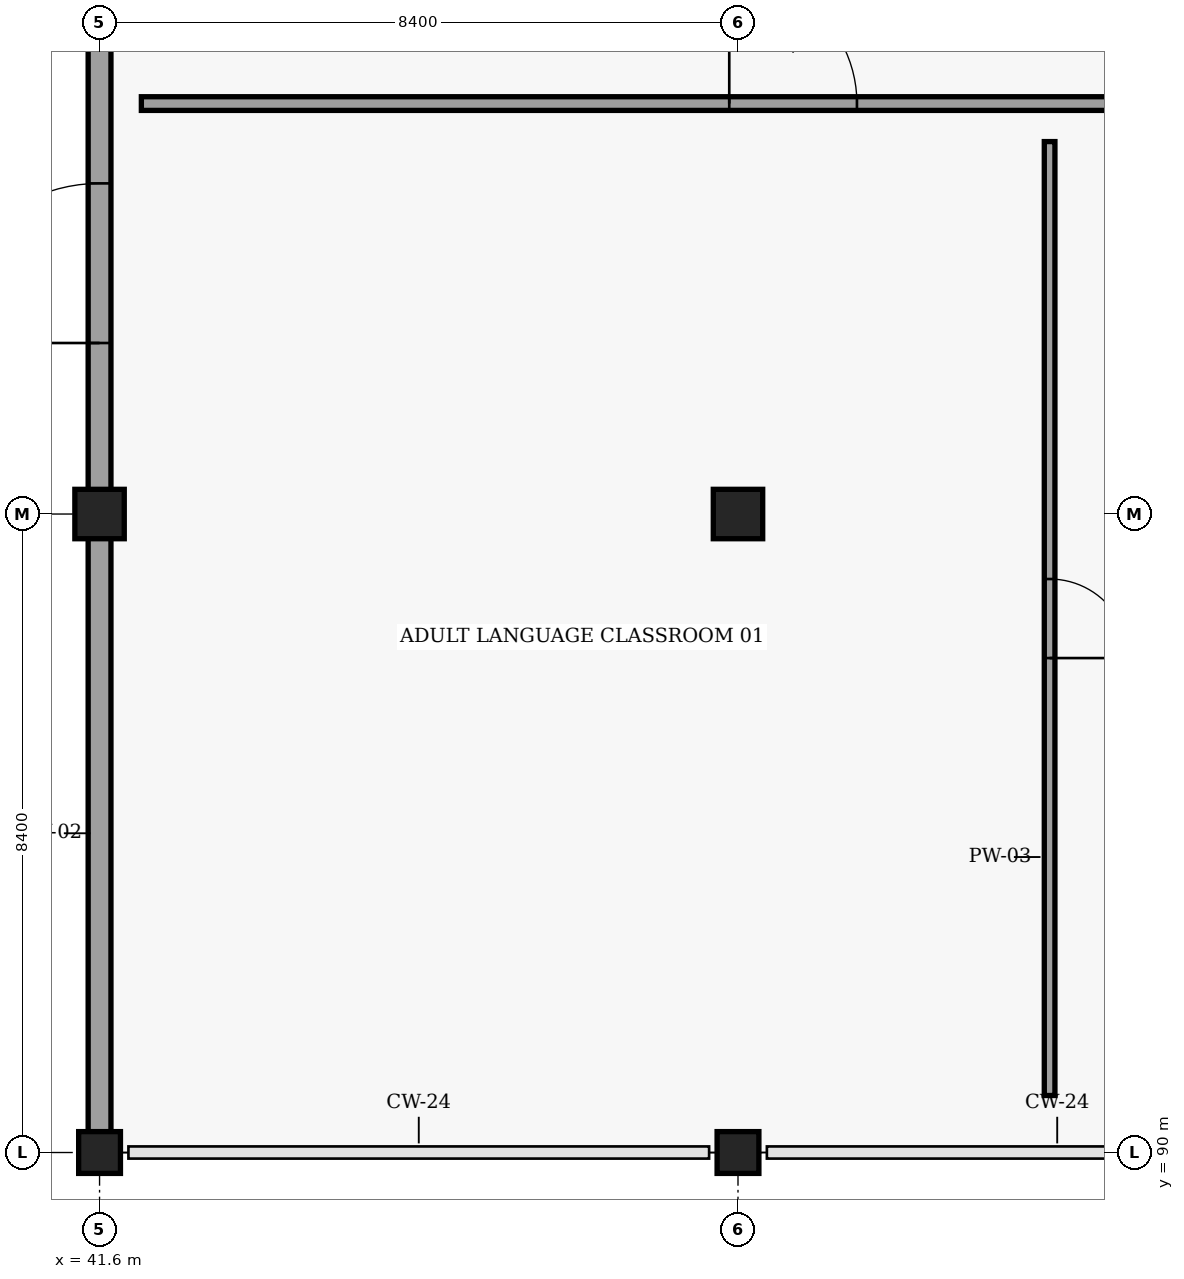
"""IFC4 building model, lengths in metres.
Left out: names, types, materials, properties, quantities, classifications, styles, units other than length and angle.
Written with IfcOpenShell. Run it as: python <this file> out.ifc"""

import sys

from ifc_helpers import new_model, si_unit, direction, frame, frame_2d, origin, origin_2d, place, context, subcontext, project, spatial, rectangle, circle, extrude, element, fill, save


model = new_model("IFC4")
c1 = context("Model", 3, precision=1e-05, world=origin(), true_north=direction((0.0, 1.0)))
c2 = subcontext(c1, "Body", "Model", "MODEL_VIEW")
j1 = project(units=[si_unit("LENGTHUNIT", "METRE"), si_unit("PLANEANGLEUNIT", "RADIAN")], contexts=[c1])
p1 = place(None, origin())
s1 = spatial("IfcSite", under=j1, at=p1, CompositionType="ELEMENT")
p2 = place(p1, origin())
s2 = spatial("IfcBuilding", under=s1, at=p2, CompositionType="ELEMENT")
p3 = place(p2, origin())
s3 = spatial("IfcBuildingStorey", under=s2, at=p3, CompositionType="ELEMENT", Elevation=0.0)
p4 = place(p3, frame((41.6, 90.0, 0.0), z_axis=(0.0, 0.0, 1.0), x_axis=(1.0, 0.0, 0.0)))
e1 = element("IfcColumn", 1, at=p4, inside=s3, PredefinedType="PILASTER", context=c2, shape_type="SweptSolid", body=[
    extrude(circle(Radius=0.275, at=origin_2d()), origin(), (0.0, 0.0, 1.0), 4.8),
])
p5 = place(p3, frame((41.6, 98.4, 0.0), z_axis=(0.0, 0.0, 1.0), x_axis=(1.0, 0.0, 0.0)))
e2 = element("IfcColumn", 2, at=p5, inside=s3, PredefinedType="COLUMN", context=c2, shape_type="SweptSolid", body=[
    extrude(rectangle(XDim=0.65, YDim=0.65, at=origin_2d()), origin(), (0.0, 0.0, 1.0), 4.8),
])
p6 = place(p3, frame((50.0, 90.0, 0.0), z_axis=(0.0, 0.0, 1.0), x_axis=(1.0, 0.0, 0.0)))
e3 = element("IfcColumn", 3, at=p6, inside=s3, PredefinedType="PILASTER", context=c2, shape_type="SweptSolid", body=[
    extrude(circle(Radius=0.275, at=origin_2d()), origin(), (0.0, 0.0, 1.0), 4.8),
])
p7 = place(p3, frame((50.0, 98.4, 0.0), z_axis=(0.0, 0.0, 1.0), x_axis=(1.0, 0.0, 0.0)))
e4 = element("IfcColumn", 4, at=p7, inside=s3, PredefinedType="COLUMN", context=c2, shape_type="SweptSolid", body=[
    extrude(rectangle(XDim=0.65, YDim=0.65, at=origin_2d()), origin(), (0.0, 0.0, 1.0), 4.8),
])
p8 = place(p3, frame((41.6, 90.1, 0.0), z_axis=(0.0, 0.0, 1.0), x_axis=(0.0, 1.0, 0.0)))
e5 = element("IfcWall", 5, at=p8, inside=s3, PredefinedType="SOLIDWALL", context=c2, shape_type="SweptSolid", body=[
    extrude(rectangle(XDim=8.2, YDim=0.3, at=frame_2d((4.1, 0.0))), origin(), (0.0, 0.0, 1.0), 4.075),
])
p9 = place(p3, frame((41.6, 98.5, 0.0), z_axis=(0.0, 0.0, 1.0), x_axis=(0.0, 1.0, 0.0)))
e6 = element("IfcWall", 6, at=p9, inside=s3, PredefinedType="SOLIDWALL", context=c2, shape_type="SweptSolid", body=[
    extrude(rectangle(XDim=8.2, YDim=0.3, at=frame_2d((4.1, 0.0))), origin(), (0.0, 0.0, 1.0), 4.075),
])
p10 = place(p9, frame((2.15, 0.0, 0.0)))
e7 = element("IfcOpeningElement", 7, at=p10, cuts=e6, PredefinedType="OPENING", context=c2, shape_type="SweptSolid", body=[
    extrude(rectangle(XDim=2.1, YDim=2.35, at=frame_2d((1.05, 1.175))), frame((0.0, 0.16, 0.0), z_axis=(0.0, -1.0, 0.0), x_axis=(1.0, 0.0, 0.0)), (0.0, 0.0, 1.0), 0.32),
])
p11 = place(p3, frame((42.15, 103.8, 0.0), z_axis=(0.0, 0.0, 1.0), x_axis=(1.0, 0.0, 0.0)))
e8 = element("IfcWall", 8, at=p11, inside=s3, PredefinedType="PARTITIONING", context=c2, shape_type="SweptSolid", body=[
    extrude(rectangle(XDim=102.9, YDim=0.18, at=frame_2d((51.45, 0.0))), origin(), (0.0, 0.0, 1.0), 3.775),
])
p12 = place(p11, frame((7.735, 0.0, 0.0)))
e9 = element("IfcOpeningElement", 9, at=p12, cuts=e8, PredefinedType="OPENING", context=c2, shape_type="SweptSolid", body=[
    extrude(rectangle(XDim=1.68, YDim=2.26, at=frame_2d((0.84, 1.13))), frame((0.0, 0.1, 0.0), z_axis=(0.0, -1.0, 0.0), x_axis=(1.0, 0.0, 0.0)), (0.0, 0.0, 1.0), 0.2),
])
p13 = place(p11, frame((16.63, 0.0, 0.0)))
e10 = element("IfcOpeningElement", 10, at=p13, cuts=e8, PredefinedType="OPENING", context=c2, shape_type="SweptSolid", body=[
    extrude(rectangle(XDim=1.04, YDim=2.08, at=frame_2d((0.52, 1.04))), frame((0.0, 0.1, 0.0), z_axis=(0.0, -1.0, 0.0), x_axis=(1.0, 0.0, 0.0)), (0.0, 0.0, 1.0), 0.2),
])
p14 = place(p11, frame((24.725, 0.0, 0.0)))
e11 = element("IfcOpeningElement", 11, at=p14, cuts=e8, PredefinedType="OPENING", context=c2, shape_type="SweptSolid", body=[
    extrude(rectangle(XDim=2.0, YDim=2.3, at=frame_2d((1.0, 1.15))), frame((0.0, 0.1, 0.0), z_axis=(0.0, -1.0, 0.0), x_axis=(1.0, 0.0, 0.0)), (0.0, 0.0, 1.0), 0.2),
])
p15 = place(p11, frame((33.375, 0.0, 0.0)))
e12 = element("IfcOpeningElement", 12, at=p15, cuts=e8, PredefinedType="OPENING", context=c2, shape_type="SweptSolid", body=[
    extrude(rectangle(XDim=1.85, YDim=2.22, at=frame_2d((0.925, 1.11))), frame((0.0, 0.1, 0.0), z_axis=(0.0, -1.0, 0.0), x_axis=(1.0, 0.0, 0.0)), (0.0, 0.0, 1.0), 0.2),
])
p16 = place(p11, frame((42.315, 0.0, 0.0)))
e13 = element("IfcOpeningElement", 13, at=p16, cuts=e8, PredefinedType="OPENING", context=c2, shape_type="SweptSolid", body=[
    extrude(rectangle(XDim=1.12, YDim=2.16, at=frame_2d((0.56, 1.08))), frame((0.0, 0.1, 0.0), z_axis=(0.0, -1.0, 0.0), x_axis=(1.0, 0.0, 0.0)), (0.0, 0.0, 1.0), 0.2),
])
p17 = place(p11, frame((50.92, 0.0, 0.0)))
e14 = element("IfcOpeningElement", 14, at=p17, cuts=e8, PredefinedType="OPENING", context=c2, shape_type="SweptSolid", body=[
    extrude(rectangle(XDim=1.06, YDim=2.16, at=frame_2d((0.53, 1.08))), frame((0.0, 0.1, 0.0), z_axis=(0.0, -1.0, 0.0), x_axis=(1.0, 0.0, 0.0)), (0.0, 0.0, 1.0), 0.2),
])
p18 = place(p11, frame((59.525, 0.0, 0.0)))
e15 = element("IfcOpeningElement", 15, at=p18, cuts=e8, PredefinedType="OPENING", context=c2, shape_type="SweptSolid", body=[
    extrude(rectangle(XDim=1.0, YDim=2.14, at=frame_2d((0.5, 1.07))), frame((0.0, 0.1, 0.0), z_axis=(0.0, -1.0, 0.0), x_axis=(1.0, 0.0, 0.0)), (0.0, 0.0, 1.0), 0.2),
])
p19 = place(p11, frame((68.11, 0.0, 0.0)))
e16 = element("IfcOpeningElement", 16, at=p19, cuts=e8, PredefinedType="OPENING", context=c2, shape_type="SweptSolid", body=[
    extrude(rectangle(XDim=0.98, YDim=2.12, at=frame_2d((0.49, 1.06))), frame((0.0, 0.1, 0.0), z_axis=(0.0, -1.0, 0.0), x_axis=(1.0, 0.0, 0.0)), (0.0, 0.0, 1.0), 0.2),
])
p20 = place(p11, frame((76.7, 0.0, 0.0)))
e17 = element("IfcOpeningElement", 17, at=p20, cuts=e8, PredefinedType="OPENING", context=c2, shape_type="SweptSolid", body=[
    extrude(rectangle(XDim=0.95, YDim=2.12, at=frame_2d((0.475, 1.06))), frame((0.0, 0.1, 0.0), z_axis=(0.0, -1.0, 0.0), x_axis=(1.0, 0.0, 0.0)), (0.0, 0.0, 1.0), 0.2),
])
p21 = place(p11, frame((85.29, 0.0, 0.0)))
e18 = element("IfcOpeningElement", 18, at=p21, cuts=e8, PredefinedType="OPENING", context=c2, shape_type="SweptSolid", body=[
    extrude(rectangle(XDim=0.92, YDim=2.1, at=frame_2d((0.46, 1.05))), frame((0.0, 0.1, 0.0), z_axis=(0.0, -1.0, 0.0), x_axis=(1.0, 0.0, 0.0)), (0.0, 0.0, 1.0), 0.2),
])
p22 = place(p11, frame((93.845, 0.0, 0.0)))
e19 = element("IfcOpeningElement", 19, at=p22, cuts=e8, PredefinedType="OPENING", context=c2, shape_type="SweptSolid", body=[
    extrude(rectangle(XDim=0.96, YDim=2.08, at=frame_2d((0.48, 1.04))), frame((0.0, 0.1, 0.0), z_axis=(0.0, -1.0, 0.0), x_axis=(1.0, 0.0, 0.0)), (0.0, 0.0, 1.0), 0.2),
])
p23 = place(p3, frame((54.1, 90.75, 0.0), z_axis=(0.0, 0.0, 1.0), x_axis=(0.0, 1.0, 0.0)))
e20 = element("IfcWall", 20, at=p23, inside=s3, PredefinedType="PARTITIONING", context=c2, shape_type="SweptSolid", body=[
    extrude(rectangle(XDim=12.55, YDim=0.14, at=frame_2d((6.275, 0.0))), origin(), (0.0, 0.0, 1.0), 3.275),
])
p24 = place(p23, frame((5.755, 0.0, 0.0)))
e21 = element("IfcOpeningElement", 21, at=p24, cuts=e20, PredefinedType="OPENING", context=c2, shape_type="SweptSolid", body=[
    extrude(rectangle(XDim=1.04, YDim=2.08, at=frame_2d((0.52, 1.04))), frame((0.0, 0.08, 0.0), z_axis=(0.0, -1.0, 0.0), x_axis=(1.0, 0.0, 0.0)), (0.0, 0.0, 1.0), 0.16),
])
p25 = place(p10, origin())
e22 = element("IfcDoor", 22, at=p25, inside=s3, OperationType="DOUBLE_DOOR_SINGLE_SWING", PredefinedType="DOOR", context=c2, shape_type="SweptSolid", body=[
    extrude(rectangle(XDim=2.1, YDim=2.35, at=frame_2d((1.05, 1.175))), frame((0.0, 0.025, 0.0), z_axis=(0.0, -1.0, 0.0), x_axis=(1.0, 0.0, 0.0)), (0.0, 0.0, 1.0), 0.05),
])
fill(e7, e22)
p26 = place(p12, origin())
e23 = element("IfcDoor", 23, at=p26, inside=s3, OperationType="DOUBLE_DOOR_SINGLE_SWING", PredefinedType="DOOR", context=c2, shape_type="SweptSolid", body=[
    extrude(rectangle(XDim=1.68, YDim=2.26, at=frame_2d((0.84, 1.13))), frame((0.0, 0.025, 0.0), z_axis=(0.0, -1.0, 0.0), x_axis=(1.0, 0.0, 0.0)), (0.0, 0.0, 1.0), 0.05),
])
fill(e9, e23)
p27 = place(p24, origin())
e24 = element("IfcDoor", 24, at=p27, inside=s3, OperationType="SINGLE_SWING_RIGHT", PredefinedType="DOOR", context=c2, shape_type="SweptSolid", body=[
    extrude(rectangle(XDim=1.04, YDim=2.08, at=frame_2d((0.52, 1.04))), frame((0.0, 0.025, 0.0), z_axis=(0.0, -1.0, 0.0), x_axis=(1.0, 0.0, 0.0)), (0.0, 0.0, 1.0), 0.05),
])
fill(e21, e24)
save(model, sys.argv[1])
